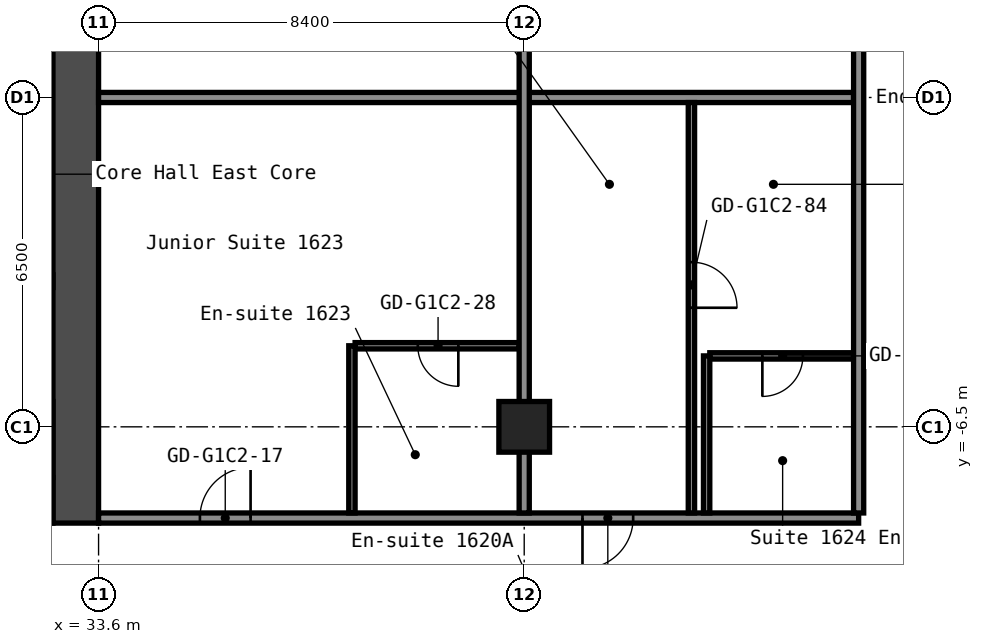
"""IFC4 building model, lengths in metres.
Left out: names, types, materials, properties, quantities, classifications, styles, units other than length and angle.
Written with IfcOpenShell. Run it as: python <this file> out.ifc"""

import sys

from ifc_helpers import new_model, si_unit, direction, frame, frame_2d, origin, origin_2d, place, context, subcontext, project, spatial, rectangle, hollow_rectangle, extrude, element, fill, save


model = new_model("IFC4")
c1 = context("Model", 3, precision=1e-05, world=origin(), true_north=direction((0.0, 1.0)))
c2 = subcontext(c1, "Body", "Model", "MODEL_VIEW")
j1 = project(units=[si_unit("LENGTHUNIT", "METRE"), si_unit("PLANEANGLEUNIT", "RADIAN")], contexts=[c1])
p1 = place(None, origin())
s1 = spatial("IfcSite", under=j1, at=p1, CompositionType="ELEMENT")
p2 = place(p1, origin())
s2 = spatial("IfcBuilding", under=s1, at=p2, CompositionType="ELEMENT")
p3 = place(p2, frame((0.0, 0.0, 58.2)))
s3 = spatial("IfcBuildingStorey", under=s2, at=p3, CompositionType="ELEMENT", Elevation=58.2)
p4 = place(p3, frame((42.0, -6.5, 0.0), z_axis=(0.0, 0.0, 1.0), x_axis=(1.0, 0.0, 0.0)))
e1 = element("IfcColumn", 1, at=p4, inside=s3, PredefinedType="COLUMN", context=c2, shape_type="SweptSolid", body=[
    extrude(hollow_rectangle(XDim=1.0, YDim=1.0, WallThickness=0.04, at=origin_2d()), origin(), (0.0, 0.0, 1.0), 2.8),
])
p5 = place(p3, frame((33.15, -8.4, 0.0), z_axis=(0.0, 0.0, 1.0), x_axis=(0.0, 1.0, 0.0)))
e2 = element("IfcWall", 2, at=p5, inside=s3, PredefinedType="SHEAR", context=c2, shape_type="SweptSolid", body=[
    extrude(rectangle(XDim=16.8, YDim=0.9, at=frame_2d((8.4, 0.0))), origin(), (0.0, 0.0, 1.0), 2.8),
])
p6 = place(p3, frame((33.6, -8.3, 0.0), z_axis=(0.0, 0.0, 1.0), x_axis=(1.0, 0.0, 0.0)))
e3 = element("IfcWall", 3, at=p6, inside=s3, PredefinedType="PARTITIONING", context=c2, shape_type="SweptSolid", body=[
    extrude(rectangle(XDim=15.0, YDim=0.2, at=frame_2d((7.5, 0.0))), origin(), (0.0, 0.0, 1.0), 2.8),
])
p7 = place(p6, frame((2.0, 0.0, 0.0)))
e4 = element("IfcOpeningElement", 4, at=p7, cuts=e3, PredefinedType="OPENING", context=c2, shape_type="SweptSolid", body=[
    extrude(rectangle(XDim=1.0, YDim=2.1, at=frame_2d((0.5, 1.05))), frame((0.0, 0.11, 0.0), z_axis=(0.0, -1.0, 0.0), x_axis=(1.0, 0.0, 0.0)), (0.0, 0.0, 1.0), 0.22),
])
p8 = place(p6, frame((9.55, 0.0, 0.0)))
e5 = element("IfcOpeningElement", 5, at=p8, cuts=e3, PredefinedType="OPENING", context=c2, shape_type="SweptSolid", body=[
    extrude(rectangle(XDim=1.0, YDim=2.1, at=frame_2d((0.5, 1.05))), frame((0.0, 0.11, 0.0), z_axis=(0.0, -1.0, 0.0), x_axis=(1.0, 0.0, 0.0)), (0.0, 0.0, 1.0), 0.22),
])
p9 = place(p3, frame((45.663, -5.1, 0.0), z_axis=(0.0, 0.0, 1.0), x_axis=(1.0, 0.0, 0.0)))
e6 = element("IfcWall", 6, at=p9, inside=s3, PredefinedType="PARTITIONING", context=c2, shape_type="SweptSolid", body=[
    extrude(rectangle(XDim=2.837, YDim=0.125, at=frame_2d((1.419, 0.0))), origin(), (0.0, 0.0, 1.0), 2.8),
])
p10 = place(p9, frame((1.038, 0.0, 0.0)))
e7 = element("IfcOpeningElement", 7, at=p10, cuts=e6, PredefinedType="OPENING", context=c2, shape_type="SweptSolid", body=[
    extrude(rectangle(XDim=0.8, YDim=2.1, at=frame_2d((0.4, 1.05))), frame((0.0, 0.073, 0.0), z_axis=(0.0, -1.0, 0.0), x_axis=(1.0, 0.0, 0.0)), (0.0, 0.0, 1.0), 0.145),
])
p11 = place(p3, frame((38.663, -4.9, 0.0), z_axis=(0.0, 0.0, 1.0), x_axis=(1.0, 0.0, 0.0)))
e8 = element("IfcWall", 8, at=p11, inside=s3, PredefinedType="PARTITIONING", context=c2, shape_type="SweptSolid", body=[
    extrude(rectangle(XDim=3.237, YDim=0.125, at=frame_2d((1.619, 0.0))), origin(), (0.0, 0.0, 1.0), 2.8),
])
p12 = place(p11, frame((1.238, 0.0, 0.0)))
e9 = element("IfcOpeningElement", 9, at=p12, cuts=e8, PredefinedType="OPENING", context=c2, shape_type="SweptSolid", body=[
    extrude(rectangle(XDim=0.8, YDim=2.1, at=frame_2d((0.4, 1.05))), frame((0.0, 0.073, 0.0), z_axis=(0.0, -1.0, 0.0), x_axis=(1.0, 0.0, 0.0)), (0.0, 0.0, 1.0), 0.145),
])
p13 = place(p3, frame((33.6, 0.0, 0.0), z_axis=(0.0, 0.0, 1.0), x_axis=(1.0, 0.0, 0.0)))
e10 = element("IfcWall", 10, at=p13, inside=s3, PredefinedType="PARTITIONING", context=c2, shape_type="SweptSolid", body=[
    extrude(rectangle(XDim=14.9, YDim=0.2, at=frame_2d((7.45, 0.0))), origin(), (0.0, 0.0, 1.0), 2.8),
])
p14 = place(p3, frame((38.6, -8.2, 0.0), z_axis=(0.0, 0.0, 1.0), x_axis=(0.0, 1.0, 0.0)))
e11 = element("IfcWall", 11, at=p14, inside=s3, PredefinedType="PARTITIONING", context=c2, shape_type="SweptSolid", body=[
    extrude(rectangle(XDim=3.3, YDim=0.125, at=frame_2d((1.65, 0.0))), origin(), (0.0, 0.0, 1.0), 2.8),
])
p15 = place(p3, frame((42.0, -8.2, 0.0), z_axis=(0.0, 0.0, 1.0), x_axis=(0.0, 1.0, 0.0)))
e12 = element("IfcWall", 12, at=p15, inside=s3, PredefinedType="PARTITIONING", context=c2, shape_type="SweptSolid", body=[
    extrude(rectangle(XDim=16.4, YDim=0.2, at=frame_2d((8.2, 0.0))), origin(), (0.0, 0.0, 1.0), 2.8),
])
p16 = place(p3, frame((45.3, -8.2, 0.0), z_axis=(0.0, 0.0, 1.0), x_axis=(0.0, 1.0, 0.0)))
e13 = element("IfcWall", 13, at=p16, inside=s3, PredefinedType="PARTITIONING", context=c2, shape_type="SweptSolid", body=[
    extrude(rectangle(XDim=8.1, YDim=0.125, at=frame_2d((4.05, 0.0))), origin(), (0.0, 0.0, 1.0), 2.8),
])
p17 = place(p16, frame((4.05, 0.0, 0.0)))
e14 = element("IfcOpeningElement", 14, at=p17, cuts=e13, PredefinedType="OPENING", context=c2, shape_type="SweptSolid", body=[
    extrude(rectangle(XDim=0.9, YDim=2.1, at=frame_2d((0.45, 1.05))), frame((0.0, 0.073, 0.0), z_axis=(0.0, -1.0, 0.0), x_axis=(1.0, 0.0, 0.0)), (0.0, 0.0, 1.0), 0.145),
])
p18 = place(p3, frame((45.6, -8.2, 0.0), z_axis=(0.0, 0.0, 1.0), x_axis=(0.0, 1.0, 0.0)))
e15 = element("IfcWall", 15, at=p18, inside=s3, PredefinedType="PARTITIONING", context=c2, shape_type="SweptSolid", body=[
    extrude(rectangle(XDim=3.1, YDim=0.125, at=frame_2d((1.55, 0.0))), origin(), (0.0, 0.0, 1.0), 2.8),
])
p19 = place(p3, frame((48.6, -8.2, 0.0), z_axis=(0.0, 0.0, 1.0), x_axis=(0.0, 1.0, 0.0)))
e16 = element("IfcWall", 16, at=p19, inside=s3, PredefinedType="PARTITIONING", context=c2, shape_type="SweptSolid", body=[
    extrude(rectangle(XDim=16.4, YDim=0.2, at=frame_2d((8.2, 0.0))), origin(), (0.0, 0.0, 1.0), 2.8),
])
p20 = place(p7, origin())
e17 = element("IfcDoor", 17, at=p20, inside=s3, OperationType="SINGLE_SWING_LEFT", PredefinedType="DOOR", context=c2, shape_type="SweptSolid", body=[
    extrude(rectangle(XDim=1.0, YDim=2.1, at=frame_2d((0.5, 1.05))), frame((0.0, 0.025, 0.0), z_axis=(0.0, -1.0, 0.0), x_axis=(1.0, 0.0, 0.0)), (0.0, 0.0, 1.0), 0.05),
])
fill(e4, e17)
p21 = place(p8, origin())
e18 = element("IfcDoor", 18, at=p21, inside=s3, OperationType="SINGLE_SWING_LEFT", PredefinedType="DOOR", context=c2, shape_type="SweptSolid", body=[
    extrude(rectangle(XDim=1.0, YDim=2.1, at=frame_2d((0.5, 1.05))), frame((0.0, 0.025, 0.0), z_axis=(0.0, -1.0, 0.0), x_axis=(1.0, 0.0, 0.0)), (0.0, 0.0, 1.0), 0.05),
])
fill(e5, e18)
p22 = place(p10, origin())
e19 = element("IfcDoor", 19, at=p22, inside=s3, OperationType="SINGLE_SWING_LEFT", PredefinedType="DOOR", context=c2, shape_type="SweptSolid", body=[
    extrude(rectangle(XDim=0.8, YDim=2.1, at=frame_2d((0.4, 1.05))), frame((0.0, 0.025, 0.0), z_axis=(0.0, -1.0, 0.0), x_axis=(1.0, 0.0, 0.0)), (0.0, 0.0, 1.0), 0.05),
])
fill(e7, e19)
p23 = place(p12, origin())
e20 = element("IfcDoor", 20, at=p23, inside=s3, OperationType="SINGLE_SWING_RIGHT", PredefinedType="DOOR", context=c2, shape_type="SweptSolid", body=[
    extrude(rectangle(XDim=0.8, YDim=2.1, at=frame_2d((0.4, 1.05))), frame((0.0, 0.025, 0.0), z_axis=(0.0, -1.0, 0.0), x_axis=(1.0, 0.0, 0.0)), (0.0, 0.0, 1.0), 0.05),
])
fill(e9, e20)
p24 = place(p17, origin())
e21 = element("IfcDoor", 21, at=p24, inside=s3, OperationType="SINGLE_SWING_LEFT", PredefinedType="DOOR", context=c2, shape_type="SweptSolid", body=[
    extrude(rectangle(XDim=0.9, YDim=2.1, at=frame_2d((0.45, 1.05))), frame((0.0, 0.025, 0.0), z_axis=(0.0, -1.0, 0.0), x_axis=(1.0, 0.0, 0.0)), (0.0, 0.0, 1.0), 0.05),
])
fill(e14, e21)
save(model, sys.argv[1])
